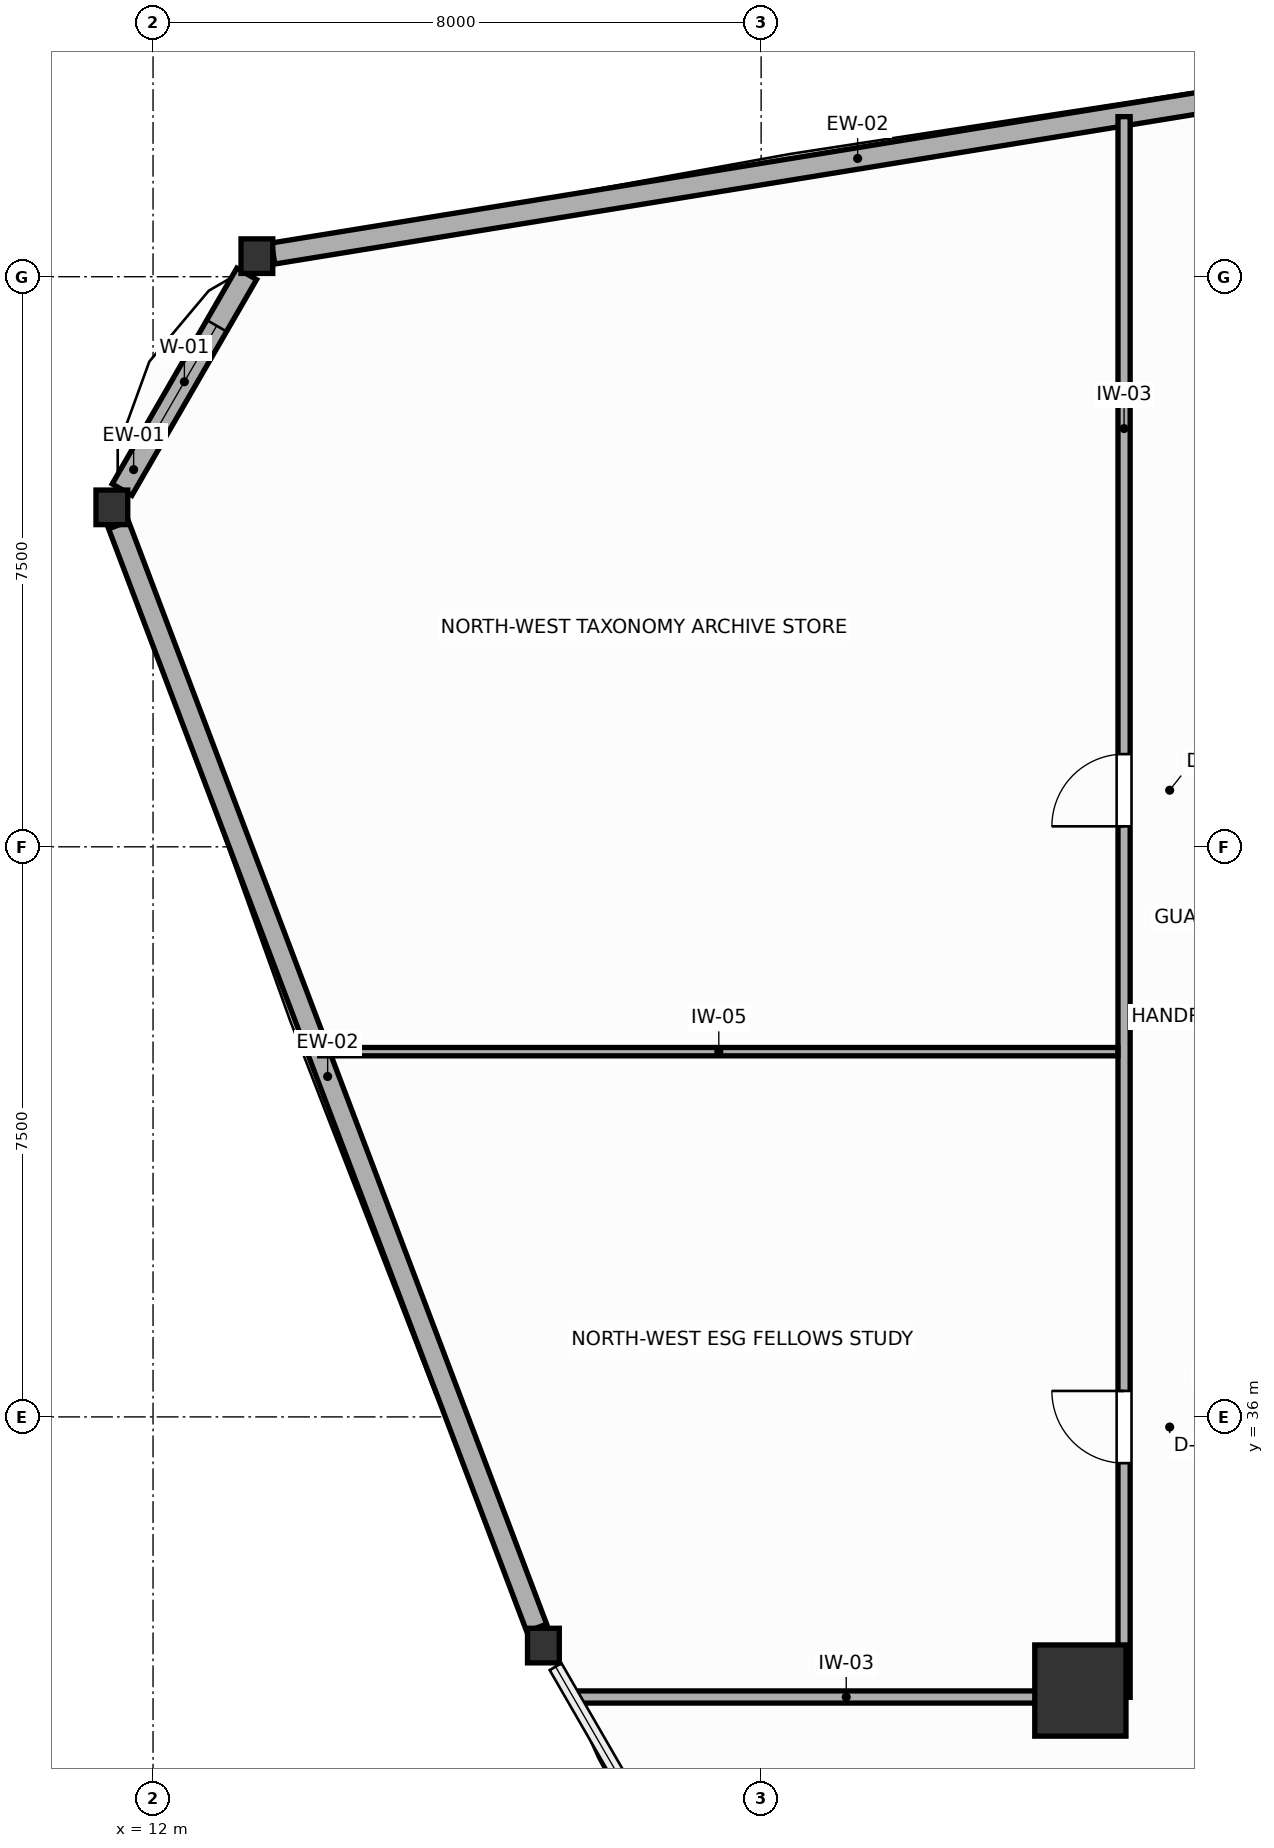
"""IFC4 building model, lengths in metres.
Left out: names, types, materials, properties, quantities, classifications, styles, units other than length and angle.
Written with IfcOpenShell. Run it as: python <this file> out.ifc"""

import sys

from ifc_helpers import new_model, si_unit, direction, frame, frame_2d, origin, origin_2d, place, context, subcontext, project, spatial, rectangle, i_section, extrude, source, transform, mapped, element, fill, save


model = new_model("IFC4")
c1 = context("Model", 3, precision=1e-05, world=origin(), true_north=direction((0.0, 1.0)))
c2 = subcontext(c1, "Body", "Model", "MODEL_VIEW")
j1 = project(units=[si_unit("LENGTHUNIT", "METRE"), si_unit("PLANEANGLEUNIT", "RADIAN")], contexts=[c1])
p1 = place(None, origin())
s1 = spatial("IfcSite", under=j1, at=p1, CompositionType="ELEMENT")
p2 = place(p1, origin())
s2 = spatial("IfcBuilding", under=s1, at=p2, CompositionType="ELEMENT")
p3 = place(p2, frame((0.0, 0.0, 124.2)))
s3 = spatial("IfcBuildingStorey", under=s2, at=p3, CompositionType="ELEMENT", Elevation=124.2)
m1 = source(origin(), c2, "Body", "SweptSolid", [
    extrude(rectangle(XDim=1.2, YDim=1.2, at=origin_2d()), origin(), (0.0, 0.0, 1.0), 3.6),
])
p4 = place(p3, frame((24.2, 32.4, 0.0), z_axis=(0.0, 0.0, 1.0), x_axis=(1.0, 0.0, 0.0)))
e1 = element("IfcColumn", 1, at=p4, inside=s3, PredefinedType="COLUMN", context=c2, shape_type="MappedRepresentation", body=[
    mapped(m1, transform((0.0, 0.0, 0.0), scale=1.0)),
])
m2 = source(origin(), c2, "Body", "SweptSolid", [
    extrude(i_section(OverallWidth=0.418, OverallDepth=0.455, WebThickness=0.039, FlangeThickness=0.063, FilletRadius=0.015, at=origin_2d()), origin(), (0.0, 0.0, 1.0), 3.6),
])
for number, where, z_axis, x_axis in (
    (2, (13.366, 51.271, 0.0), (0.0, 0.0, 1.0), (1.0, 0.0, 0.0)),
    (3, (11.458, 47.966, 0.0), (0.0, 0.0, 1.0), (1.0, 0.0, 0.0)),
    (4, (17.136, 32.991, 0.0), (0.0, 0.0, 1.0), (1.0, 0.0, 0.0)),
):
    element("IfcColumn", number, at=place(p3, frame(where, z_axis=z_axis, x_axis=x_axis)), inside=s3, PredefinedType="COLUMN", context=c2, shape_type="MappedRepresentation", body=[
        mapped(m2, transform((0.0, 0.0, 0.0), scale=1.0)),
    ])
p5 = place(p3, frame((28.959, 53.806, 0.0), z_axis=(0.0, 0.0, 1.0), x_axis=(-0.987036263752, -0.160497395736, 0.0)))
e5 = element("IfcWall", 5, at=p5, inside=s3, PredefinedType="SOLIDWALL", context=c2, shape_type="SweptSolid", body=[
    extrude(rectangle(XDim=15.581, YDim=0.28, at=frame_2d((7.791, 0.0))), origin(), (0.0, 0.0, 1.0), 2.95),
])
p6 = place(p3, frame((13.232, 51.038, 0.0), z_axis=(0.0, 0.0, 1.0), x_axis=(-0.500014611105, -0.866016967894, 0.0)))
e6 = element("IfcWall", 6, at=p6, inside=s3, PredefinedType="SOLIDWALL", context=c2, shape_type="SweptSolid", body=[
    extrude(rectangle(XDim=3.279, YDim=0.3, at=frame_2d((1.64, 0.0))), origin(), (0.0, 0.0, 1.0), 3.0),
])
p7 = place(p6, frame((0.79, 0.0, 0.75)))
e7 = element("IfcOpeningElement", 7, at=p7, cuts=e6, PredefinedType="OPENING", context=c2, shape_type="SweptSolid", body=[
    extrude(rectangle(XDim=1.7, YDim=1.75, at=frame_2d((0.85, 0.875))), frame((0.0, 0.16, 0.0), z_axis=(0.0, -1.0, 0.0), x_axis=(1.0, 0.0, 0.0)), (0.0, 0.0, 1.0), 0.32),
])
p8 = place(p3, frame((11.546, 47.734, 0.0), z_axis=(0.0, 0.0, 1.0), x_axis=(0.354519532047, -0.935048609109, 0.0)))
e8 = element("IfcWall", 8, at=p8, inside=s3, PredefinedType="SOLIDWALL", context=c2, shape_type="SweptSolid", body=[
    extrude(rectangle(XDim=15.517, YDim=0.28, at=frame_2d((7.759, 0.0))), origin(), (0.0, 0.0, 1.0), 2.95),
])
p9 = place(p3, frame((24.775, 32.31, 0.0), z_axis=(0.0, 0.0, 1.0), x_axis=(0.0, 1.0, 0.0)))
e9 = element("IfcWall", 9, at=p9, inside=s3, PredefinedType="PARTITIONING", context=c2, shape_type="SweptSolid", body=[
    extrude(rectangle(XDim=20.796, YDim=0.16, at=frame_2d((10.398, 0.0))), origin(), (0.0, 0.0, 1.0), 3.4),
])
p10 = place(p9, frame((3.082, 0.0, 0.0)))
e10 = element("IfcOpeningElement", 10, at=p10, cuts=e9, PredefinedType="OPENING", context=c2, shape_type="SweptSolid", body=[
    extrude(rectangle(XDim=0.95, YDim=2.05, at=frame_2d((0.475, 1.025))), frame((0.0, 0.09, 0.0), z_axis=(0.0, -1.0, 0.0), x_axis=(1.0, 0.0, 0.0)), (0.0, 0.0, 1.0), 0.18),
])
p11 = place(p9, frame((11.46, 0.0, 0.0)))
e11 = element("IfcOpeningElement", 11, at=p11, cuts=e9, PredefinedType="OPENING", context=c2, shape_type="SweptSolid", body=[
    extrude(rectangle(XDim=0.95, YDim=2.05, at=frame_2d((0.475, 1.025))), frame((0.0, 0.09, 0.0), z_axis=(0.0, -1.0, 0.0), x_axis=(1.0, 0.0, 0.0)), (0.0, 0.0, 1.0), 0.18),
])
p12 = place(p3, frame((17.546, 32.315, 0.0), z_axis=(0.0, 0.0, 1.0), x_axis=(1.0, 0.0, 0.0)))
e12 = element("IfcWall", 12, at=p12, inside=s3, PredefinedType="PARTITIONING", context=c2, shape_type="SweptSolid", body=[
    extrude(rectangle(XDim=7.147, YDim=0.16, at=frame_2d((3.573, 0.0))), origin(), (0.0, 0.0, 1.0), 2.95),
])
p13 = place(p3, frame((14.193, 40.805, 0.0), z_axis=(0.0, 0.0, 1.0), x_axis=(1.0, 0.0, 0.0)))
e13 = element("IfcWall", 13, at=p13, inside=s3, PredefinedType="MOVABLE", context=c2, shape_type="SweptSolid", body=[
    extrude(rectangle(XDim=10.5, YDim=0.11, at=frame_2d((5.25, 0.0))), origin(), (0.0, 0.0, 1.0), 3.4),
])
p14 = place(p7, origin())
e14 = element("IfcWindow", 14, at=p14, inside=s3, PartitioningType="SINGLE_PANEL", PredefinedType="WINDOW", context=c2, shape_type="SweptSolid", body=[
    extrude(rectangle(XDim=1.7, YDim=1.75, at=frame_2d((0.85, 0.875))), frame((0.0, 0.03, 0.0), z_axis=(0.0, -1.0, 0.0), x_axis=(1.0, 0.0, 0.0)), (0.0, 0.0, 1.0), 0.06),
])
fill(e7, e14)
p15 = place(p10, origin())
e15 = element("IfcDoor", 15, at=p15, inside=s3, OperationType="SINGLE_SWING_RIGHT", PredefinedType="DOOR", context=c2, shape_type="SweptSolid", body=[
    extrude(rectangle(XDim=0.95, YDim=2.05, at=frame_2d((0.475, 1.025))), frame((0.0, 0.025, 0.0), z_axis=(0.0, -1.0, 0.0), x_axis=(1.0, 0.0, 0.0)), (0.0, 0.0, 1.0), 0.05),
])
fill(e10, e15)
p16 = place(p11, origin())
e16 = element("IfcDoor", 16, at=p16, inside=s3, OperationType="SINGLE_SWING_LEFT", PredefinedType="DOOR", context=c2, shape_type="SweptSolid", body=[
    extrude(rectangle(XDim=0.95, YDim=2.05, at=frame_2d((0.475, 1.025))), frame((0.0, 0.025, 0.0), z_axis=(0.0, -1.0, 0.0), x_axis=(1.0, 0.0, 0.0)), (0.0, 0.0, 1.0), 0.05),
])
fill(e11, e16)
save(model, sys.argv[1])
